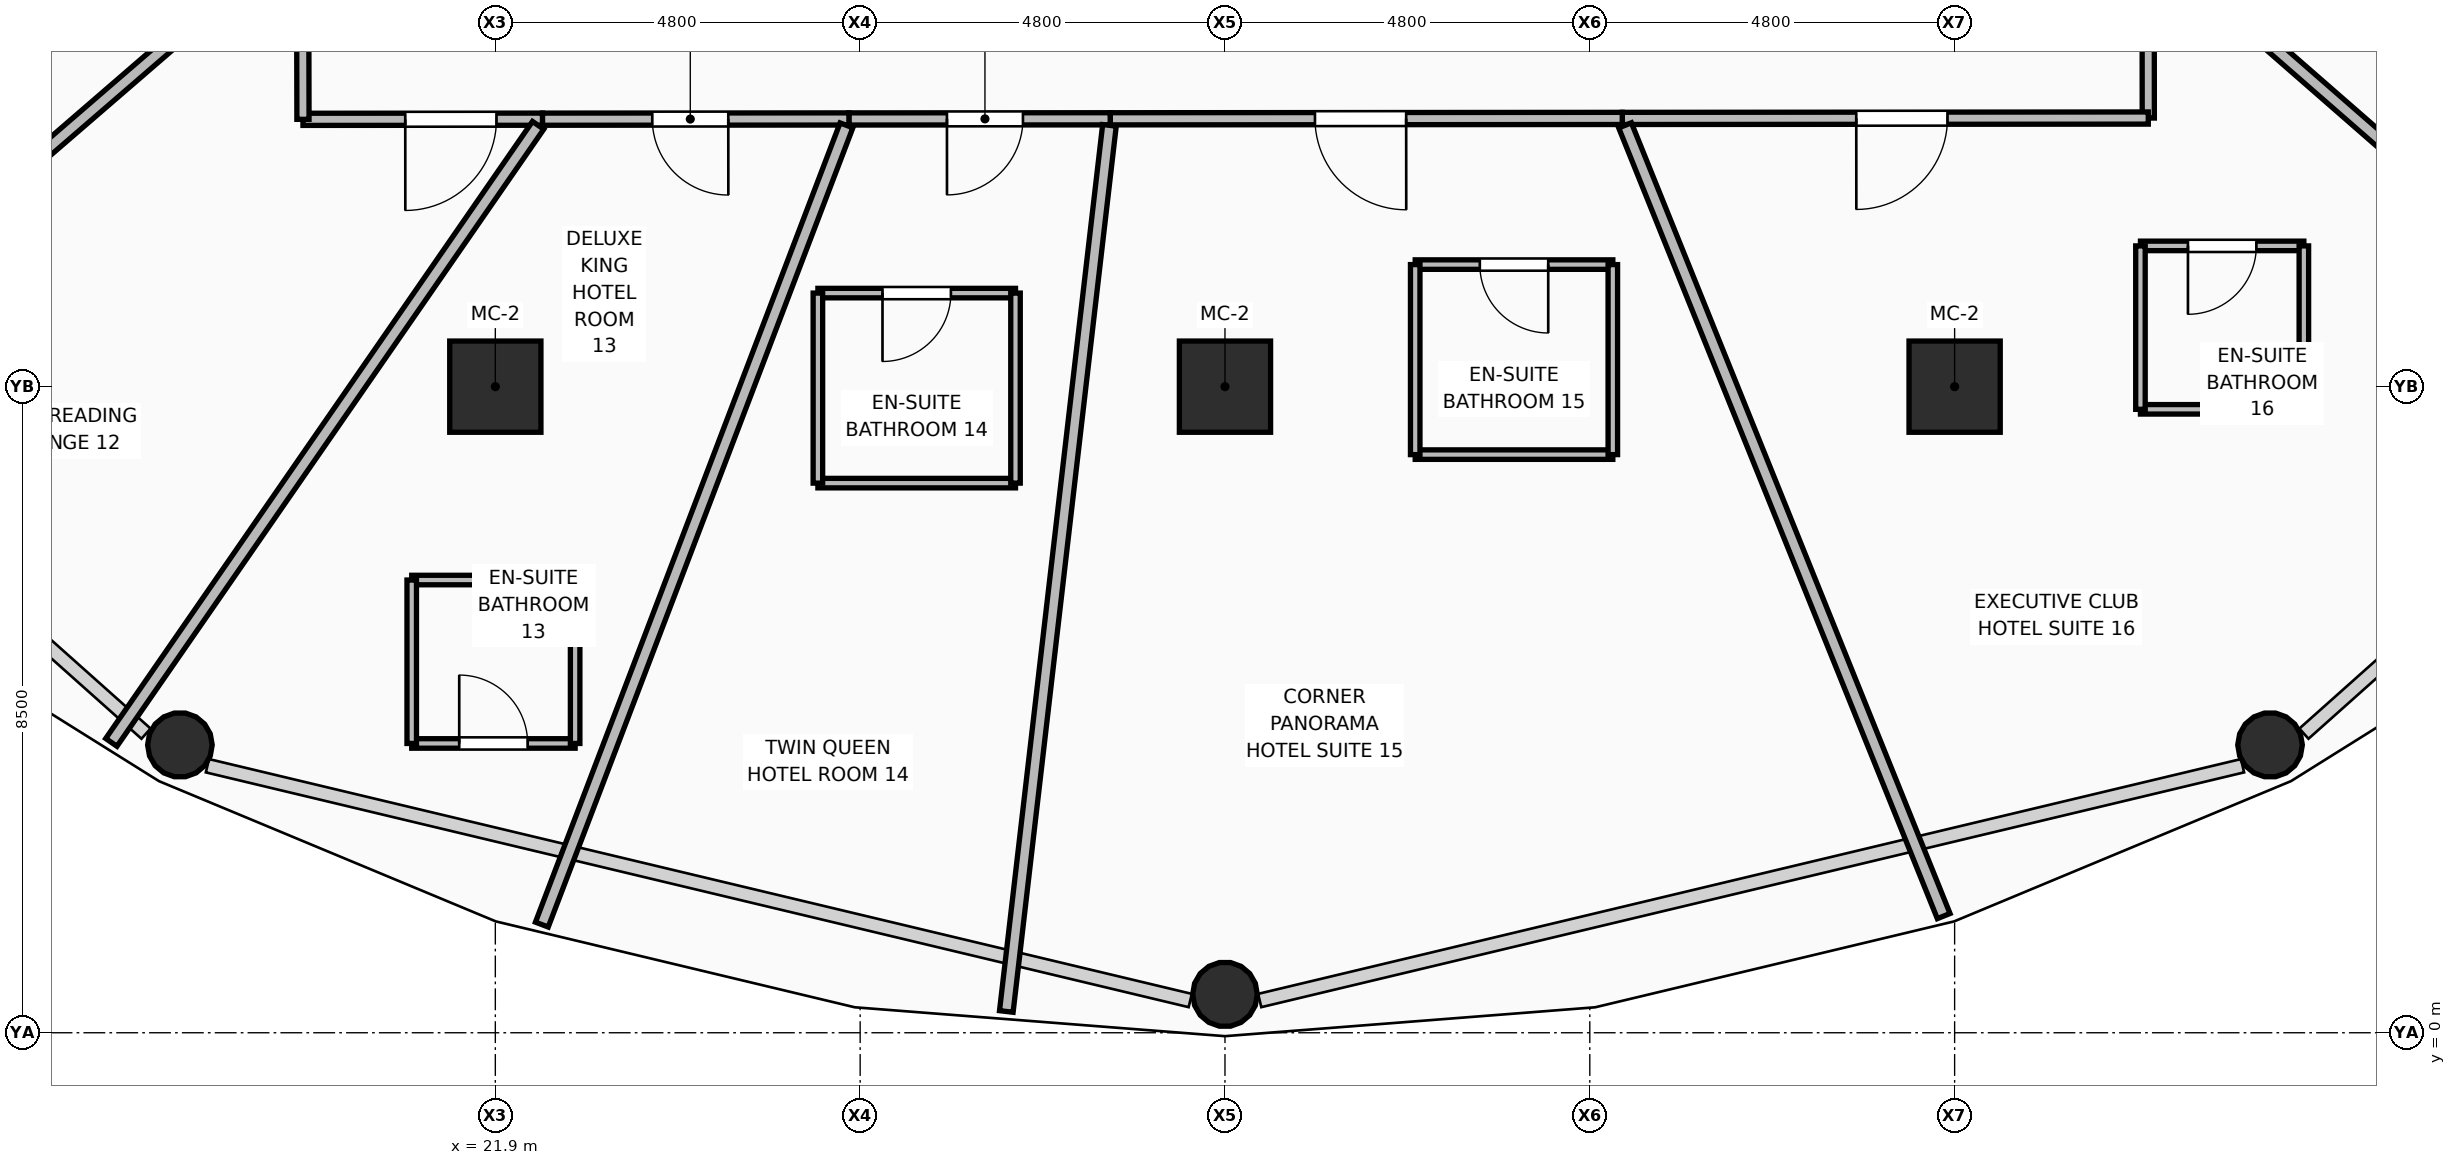
"""IFC4 building model, lengths in metres.
Left out: names, types, materials, properties, quantities, classifications, styles, units other than length and angle.
Written with IfcOpenShell. Run it as: python <this file> out.ifc"""

import sys

from ifc_helpers import new_model, si_unit, direction, frame, frame_2d, origin, origin_2d, place, context, subcontext, project, spatial, rectangle, hollow_rectangle, hollow_circle, extrude, element, fill, save


model = new_model("IFC4")
c1 = context("Model", 3, precision=1e-05, world=origin(), true_north=direction((0.0, 1.0)))
c2 = subcontext(c1, "Body", "Model", "MODEL_VIEW")
j1 = project(units=[si_unit("LENGTHUNIT", "METRE"), si_unit("PLANEANGLEUNIT", "RADIAN")], contexts=[c1])
p1 = place(None, origin())
s1 = spatial("IfcSite", under=j1, at=p1, CompositionType="ELEMENT")
p2 = place(p1, origin())
s2 = spatial("IfcBuilding", under=s1, at=p2, CompositionType="ELEMENT")
p3 = place(p2, frame((0.0, 0.0, 79.5)))
s3 = spatial("IfcBuildingStorey", under=s2, at=p3, CompositionType="ELEMENT", Elevation=79.5)
for number, where, z_axis, x_axis in (
    (1, (21.9, 8.5, 0.0), (0.0, 0.0, 1.0), (1.0, 0.0, 0.0)),
    (2, (31.5, 8.5, 0.0), (0.0, 0.0, 1.0), (1.0, 0.0, 0.0)),
    (3, (41.1, 8.5, 0.0), (0.0, 0.0, 1.0), (1.0, 0.0, 0.0)),
):
    element("IfcColumn", number, at=place(p3, frame(where, z_axis=z_axis, x_axis=x_axis)), inside=s3, PredefinedType="COLUMN", context=c2, shape_type="SweptSolid", body=[
        extrude(hollow_rectangle(XDim=1.2, YDim=1.2, WallThickness=0.045, at=origin_2d()), origin(), (0.0, 0.0, 1.0), 3.75),
    ])
for number, where, z_axis, x_axis in (
    (4, (17.75, 3.787, 0.0), (0.0, 0.0, 1.0), (1.0, 0.0, 0.0)),
    (5, (31.5, 0.505, 0.0), (0.0, 0.0, 1.0), (1.0, 0.0, 0.0)),
    (6, (45.25, 3.787, 0.0), (0.0, 0.0, 1.0), (1.0, 0.0, 0.0)),
):
    element("IfcColumn", number, at=place(p3, frame(where, z_axis=z_axis, x_axis=x_axis)), inside=s3, PredefinedType="COLUMN", context=c2, shape_type="SweptSolid", body=[
        extrude(hollow_circle(Radius=0.425, WallThickness=0.04, at=origin_2d()), origin(), (0.0, 0.0, 1.0), 3.57),
    ])
p4 = place(p3, frame((43.646, 14.406, 0.0), z_axis=(0.0, 0.0, 1.0), x_axis=(0.00082338383, -0.999999661019, 0.0)))
e7 = element("IfcWall", 7, at=p4, inside=s3, PredefinedType="PARTITIONING", context=c2, shape_type="SweptSolid", body=[
    extrude(rectangle(XDim=2.372, YDim=0.16, at=frame_2d((1.186, 0.0))), origin(), (0.0, 0.0, 1.0), 3.55),
])
p5 = place(p3, frame((43.648, 12.034, 0.0), z_axis=(0.0, 0.0, 1.0), x_axis=(-0.999999751123, -0.000705516968, 0.0)))
e8 = element("IfcWall", 8, at=p5, inside=s3, PredefinedType="PARTITIONING", context=c2, shape_type="SweptSolid", body=[
    extrude(rectangle(XDim=6.921, YDim=0.16, at=frame_2d((3.46, 0.0))), origin(), (0.0, 0.0, 1.0), 2.928),
])
p6 = place(p5, frame((2.642, 0.0, 0.0)))
e9 = element("IfcOpeningElement", 9, at=p6, cuts=e8, PredefinedType="OPENING", context=c2, shape_type="SweptSolid", body=[
    extrude(rectangle(XDim=1.2, YDim=2.1, at=frame_2d((0.6, 1.05))), frame((0.0, 0.09, 0.0), z_axis=(0.0, -1.0, 0.0), x_axis=(1.0, 0.0, 0.0)), (0.0, 0.0, 1.0), 0.18),
])
p7 = place(p3, frame((36.727, 12.029, 0.0), z_axis=(0.0, 0.0, 1.0), x_axis=(-0.999999710434, -0.000761007209, 0.0)))
e10 = element("IfcWall", 10, at=p7, inside=s3, PredefinedType="PARTITIONING", context=c2, shape_type="SweptSolid", body=[
    extrude(rectangle(XDim=6.737, YDim=0.16, at=frame_2d((3.369, 0.0))), origin(), (0.0, 0.0, 1.0), 2.928),
])
p8 = place(p7, frame((2.843, 0.0, 0.0)))
e11 = element("IfcOpeningElement", 11, at=p8, cuts=e10, PredefinedType="OPENING", context=c2, shape_type="SweptSolid", body=[
    extrude(rectangle(XDim=1.2, YDim=2.1, at=frame_2d((0.6, 1.05))), frame((0.0, 0.09, 0.0), z_axis=(0.0, -1.0, 0.0), x_axis=(1.0, 0.0, 0.0)), (0.0, 0.0, 1.0), 0.18),
])
p9 = place(p3, frame((29.99, 12.024, 0.0), z_axis=(0.0, 0.0, 1.0), x_axis=(-0.999999838631, -0.00056810103, 0.0)))
e12 = element("IfcWall", 12, at=p9, inside=s3, PredefinedType="PARTITIONING", context=c2, shape_type="SweptSolid", body=[
    extrude(rectangle(XDim=3.438, YDim=0.16, at=frame_2d((1.719, 0.0))), origin(), (0.0, 0.0, 1.0), 3.55),
])
p10 = place(p9, frame((1.148, 0.0, 0.0)))
e13 = element("IfcOpeningElement", 13, at=p10, cuts=e12, PredefinedType="OPENING", context=c2, shape_type="SweptSolid", body=[
    extrude(rectangle(XDim=1.0, YDim=2.1, at=frame_2d((0.5, 1.05))), frame((0.0, 0.09, 0.0), z_axis=(0.0, -1.0, 0.0), x_axis=(1.0, 0.0, 0.0)), (0.0, 0.0, 1.0), 0.18),
])
p11 = place(p3, frame((26.552, 12.022, 0.0), z_axis=(0.0, 0.0, 1.0), x_axis=(-0.999999736017, -0.000726611979, 0.0)))
e14 = element("IfcWall", 14, at=p11, inside=s3, PredefinedType="PARTITIONING", context=c2, shape_type="SweptSolid", body=[
    extrude(rectangle(XDim=4.032, YDim=0.16, at=frame_2d((2.016, 0.0))), origin(), (0.0, 0.0, 1.0), 3.55),
])
p12 = place(p11, frame((1.587, 0.0, 0.0)))
e15 = element("IfcOpeningElement", 15, at=p12, cuts=e14, PredefinedType="OPENING", context=c2, shape_type="SweptSolid", body=[
    extrude(rectangle(XDim=1.0, YDim=2.1, at=frame_2d((0.5, 1.05))), frame((0.0, 0.09, 0.0), z_axis=(0.0, -1.0, 0.0), x_axis=(1.0, 0.0, 0.0)), (0.0, 0.0, 1.0), 0.18),
])
p13 = place(p3, frame((22.52, 12.019, 0.0), z_axis=(0.0, 0.0, 1.0), x_axis=(-0.999999807912, -0.000619818584, 0.0)))
e16 = element("IfcWall", 16, at=p13, inside=s3, PredefinedType="PARTITIONING", context=c2, shape_type="SweptSolid", body=[
    extrude(rectangle(XDim=3.151, YDim=0.16, at=frame_2d((1.576, 0.0))), origin(), (0.0, 0.0, 1.0), 2.928),
])
p14 = place(p13, frame((0.605, 0.0, 0.0)))
e17 = element("IfcOpeningElement", 17, at=p14, cuts=e16, PredefinedType="OPENING", context=c2, shape_type="SweptSolid", body=[
    extrude(rectangle(XDim=1.2, YDim=2.1, at=frame_2d((0.6, 1.05))), frame((0.0, 0.09, 0.0), z_axis=(0.0, -1.0, 0.0), x_axis=(1.0, 0.0, 0.0)), (0.0, 0.0, 1.0), 0.18),
])
p15 = place(p3, frame((19.369, 12.017, 0.0), z_axis=(0.0, 0.0, 1.0), x_axis=(-0.001947036808, 0.999998104522, 0.0)))
e18 = element("IfcWall", 18, at=p15, inside=s3, PredefinedType="PARTITIONING", context=c2, shape_type="SweptSolid", body=[
    extrude(rectangle(XDim=2.508, YDim=0.16, at=frame_2d((1.254, 0.0))), origin(), (0.0, 0.0, 1.0), 3.55),
])
p16 = place(p3, frame((19.272, 18.099, 0.0), z_axis=(0.0, 0.0, 1.0), x_axis=(-0.870816794363, -0.491607679614, 0.0)))
e19 = element("IfcWall", 19, at=p16, inside=s3, PredefinedType="PARTITIONING", context=c2, shape_type="SweptSolid", body=[
    extrude(rectangle(XDim=13.011, YDim=0.18, at=frame_2d((6.505, 0.0))), origin(), (0.0, 0.0, 1.0), 2.775),
])
p17 = place(p3, frame((19.272, 14.446, 0.0), z_axis=(0.0, 0.0, 1.0), x_axis=(-0.756957430289, -0.653464190855, 0.0)))
e20 = element("IfcWall", 20, at=p17, inside=s3, PredefinedType="PARTITIONING", context=c2, shape_type="SweptSolid", body=[
    extrude(rectangle(XDim=10.29, YDim=0.18, at=frame_2d((5.145, 0.0))), origin(), (0.0, 0.0, 1.0), 2.775),
])
p18 = place(p3, frame((22.463, 11.938, 0.0), z_axis=(0.0, 0.0, 1.0), x_axis=(-0.568860087872, -0.822434313746, 0.0)))
e21 = element("IfcWall", 21, at=p18, inside=s3, PredefinedType="PARTITIONING", context=c2, shape_type="SweptSolid", body=[
    extrude(rectangle(XDim=9.871, YDim=0.18, at=frame_2d((4.935, 0.0))), origin(), (0.0, 0.0, 1.0), 2.775),
])
p19 = place(p3, frame((26.52, 11.938, 0.0), z_axis=(0.0, 0.0, 1.0), x_axis=(-0.356180272112, -0.934417258915, 0.0)))
e22 = element("IfcWall", 22, at=p19, inside=s3, PredefinedType="PARTITIONING", context=c2, shape_type="SweptSolid", body=[
    extrude(rectangle(XDim=11.253, YDim=0.18, at=frame_2d((5.626, 0.0))), origin(), (0.0, 0.0, 1.0), 2.775),
])
p20 = place(p3, frame((29.98, 11.938, 0.0), z_axis=(0.0, 0.0, 1.0), x_axis=(-0.115614932855, -0.993294109165, 0.0)))
e23 = element("IfcWall", 23, at=p20, inside=s3, PredefinedType="PARTITIONING", context=c2, shape_type="SweptSolid", body=[
    extrude(rectangle(XDim=11.737, YDim=0.18, at=frame_2d((5.868, 0.0))), origin(), (0.0, 0.0, 1.0), 2.775),
])
p21 = place(p3, frame((36.764, 11.938, 0.0), z_axis=(0.0, 0.0, 1.0), x_axis=(0.373765091029, -0.927523399558, 0.0)))
e24 = element("IfcWall", 24, at=p21, inside=s3, PredefinedType="PARTITIONING", context=c2, shape_type="SweptSolid", body=[
    extrude(rectangle(XDim=11.216, YDim=0.18, at=frame_2d((5.608, 0.0))), origin(), (0.0, 0.0, 1.0), 2.775),
])
p22 = place(p3, frame((43.728, 14.335, 0.0), z_axis=(0.0, 0.0, 1.0), x_axis=(0.753557452015, -0.657382055211, 0.0)))
e25 = element("IfcWall", 25, at=p22, inside=s3, PredefinedType="PARTITIONING", context=c2, shape_type="SweptSolid", body=[
    extrude(rectangle(XDim=10.2, YDim=0.18, at=frame_2d((5.1, 0.0))), origin(), (0.0, 0.0, 1.0), 2.775),
])
p23 = place(p3, frame((43.728, 18.232, 0.0), z_axis=(0.0, 0.0, 1.0), x_axis=(0.874929134989, -0.484250977022, 0.0)))
e26 = element("IfcWall", 26, at=p23, inside=s3, PredefinedType="PARTITIONING", context=c2, shape_type="SweptSolid", body=[
    extrude(rectangle(XDim=13.111, YDim=0.18, at=frame_2d((6.555, 0.0))), origin(), (0.0, 0.0, 1.0), 2.775),
])
p24 = place(p3, frame((20.8, 3.806, 0.0), z_axis=(0.0, 0.0, 1.0), x_axis=(1.0, 0.0, 0.0)))
e27 = element("IfcWall", 27, at=p24, inside=s3, PredefinedType="PARTITIONING", context=c2, shape_type="SweptSolid", body=[
    extrude(rectangle(XDim=2.15, YDim=0.125, at=frame_2d((1.075, 0.0))), origin(), (0.0, 0.0, 1.0), 3.55),
])
p25 = place(p24, frame((0.625, 0.0, 0.0)))
e28 = element("IfcOpeningElement", 28, at=p25, cuts=e27, PredefinedType="OPENING", context=c2, shape_type="SweptSolid", body=[
    extrude(rectangle(XDim=0.9, YDim=2.1, at=frame_2d((0.45, 1.05))), frame((0.0, 0.073, 0.0), z_axis=(0.0, -1.0, 0.0), x_axis=(1.0, 0.0, 0.0)), (0.0, 0.0, 1.0), 0.145),
])
p26 = place(p3, frame((20.8, 5.956, 0.0), z_axis=(0.0, 0.0, 1.0), x_axis=(1.0, 0.0, 0.0)))
e29 = element("IfcWall", 29, at=p26, inside=s3, PredefinedType="PARTITIONING", context=c2, shape_type="SweptSolid", body=[
    extrude(rectangle(XDim=2.15, YDim=0.125, at=frame_2d((1.075, 0.0))), origin(), (0.0, 0.0, 1.0), 3.55),
])
for number, where, z_axis, x_axis in (
    (30, (20.8, 3.806, 0.0), (0.0, 0.0, 1.0), (0.0, 1.0, 0.0)),
    (31, (22.95, 3.806, 0.0), (0.0, 0.0, 1.0), (0.0, 1.0, 0.0)),
):
    element("IfcWall", number, at=place(p3, frame(where, z_axis=z_axis, x_axis=x_axis)), inside=s3, PredefinedType="PARTITIONING", context=c2, shape_type="SweptSolid", body=[
        extrude(rectangle(XDim=2.15, YDim=0.125, at=frame_2d((1.075, 0.0))), origin(), (0.0, 0.0, 1.0), 3.55),
    ])
p27 = place(p3, frame((26.144, 7.231, 0.0), z_axis=(0.0, 0.0, 1.0), x_axis=(1.0, 0.0, 0.0)))
e32 = element("IfcWall", 32, at=p27, inside=s3, PredefinedType="PARTITIONING", context=c2, shape_type="SweptSolid", body=[
    extrude(rectangle(XDim=2.6, YDim=0.125, at=frame_2d((1.3, 0.0))), origin(), (0.0, 0.0, 1.0), 3.55),
])
p28 = place(p3, frame((26.144, 9.731, 0.0), z_axis=(0.0, 0.0, 1.0), x_axis=(1.0, 0.0, 0.0)))
e33 = element("IfcWall", 33, at=p28, inside=s3, PredefinedType="PARTITIONING", context=c2, shape_type="SweptSolid", body=[
    extrude(rectangle(XDim=2.6, YDim=0.125, at=frame_2d((1.3, 0.0))), origin(), (0.0, 0.0, 1.0), 3.55),
])
p29 = place(p28, frame((0.85, 0.0, 0.0)))
e34 = element("IfcOpeningElement", 34, at=p29, cuts=e33, PredefinedType="OPENING", context=c2, shape_type="SweptSolid", body=[
    extrude(rectangle(XDim=0.9, YDim=2.1, at=frame_2d((0.45, 1.05))), frame((0.0, 0.073, 0.0), z_axis=(0.0, -1.0, 0.0), x_axis=(1.0, 0.0, 0.0)), (0.0, 0.0, 1.0), 0.145),
])
for number, where, z_axis, x_axis in (
    (35, (26.144, 7.231, 0.0), (0.0, 0.0, 1.0), (0.0, 1.0, 0.0)),
    (36, (28.744, 7.231, 0.0), (0.0, 0.0, 1.0), (0.0, 1.0, 0.0)),
):
    element("IfcWall", number, at=place(p3, frame(where, z_axis=z_axis, x_axis=x_axis)), inside=s3, PredefinedType="PARTITIONING", context=c2, shape_type="SweptSolid", body=[
        extrude(rectangle(XDim=2.5, YDim=0.125, at=frame_2d((1.25, 0.0))), origin(), (0.0, 0.0, 1.0), 3.55),
    ])
p30 = place(p3, frame((34.003, 7.606, 0.0), z_axis=(0.0, 0.0, 1.0), x_axis=(1.0, 0.0, 0.0)))
e37 = element("IfcWall", 37, at=p30, inside=s3, PredefinedType="PARTITIONING", context=c2, shape_type="SweptSolid", body=[
    extrude(rectangle(XDim=2.6, YDim=0.125, at=frame_2d((1.3, 0.0))), origin(), (0.0, 0.0, 1.0), 3.55),
])
p31 = place(p3, frame((34.003, 10.106, 0.0), z_axis=(0.0, 0.0, 1.0), x_axis=(1.0, 0.0, 0.0)))
e38 = element("IfcWall", 38, at=p31, inside=s3, PredefinedType="PARTITIONING", context=c2, shape_type="SweptSolid", body=[
    extrude(rectangle(XDim=2.6, YDim=0.125, at=frame_2d((1.3, 0.0))), origin(), (0.0, 0.0, 1.0), 3.55),
])
p32 = place(p31, frame((0.85, 0.0, 0.0)))
e39 = element("IfcOpeningElement", 39, at=p32, cuts=e38, PredefinedType="OPENING", context=c2, shape_type="SweptSolid", body=[
    extrude(rectangle(XDim=0.9, YDim=2.1, at=frame_2d((0.45, 1.05))), frame((0.0, 0.073, 0.0), z_axis=(0.0, -1.0, 0.0), x_axis=(1.0, 0.0, 0.0)), (0.0, 0.0, 1.0), 0.145),
])
for number, where, z_axis, x_axis in (
    (40, (34.003, 7.606, 0.0), (0.0, 0.0, 1.0), (0.0, 1.0, 0.0)),
    (41, (36.603, 7.606, 0.0), (0.0, 0.0, 1.0), (0.0, 1.0, 0.0)),
):
    element("IfcWall", number, at=place(p3, frame(where, z_axis=z_axis, x_axis=x_axis)), inside=s3, PredefinedType="PARTITIONING", context=c2, shape_type="SweptSolid", body=[
        extrude(rectangle(XDim=2.5, YDim=0.125, at=frame_2d((1.25, 0.0))), origin(), (0.0, 0.0, 1.0), 3.55),
    ])
p33 = place(p3, frame((43.545, 8.202, 0.0), z_axis=(0.0, 0.0, 1.0), x_axis=(1.0, 0.0, 0.0)))
e42 = element("IfcWall", 42, at=p33, inside=s3, PredefinedType="PARTITIONING", context=c2, shape_type="SweptSolid", body=[
    extrude(rectangle(XDim=2.15, YDim=0.125, at=frame_2d((1.075, 0.0))), origin(), (0.0, 0.0, 1.0), 2.928),
])
p34 = place(p3, frame((43.545, 10.352, 0.0), z_axis=(0.0, 0.0, 1.0), x_axis=(1.0, 0.0, 0.0)))
e43 = element("IfcWall", 43, at=p34, inside=s3, PredefinedType="PARTITIONING", context=c2, shape_type="SweptSolid", body=[
    extrude(rectangle(XDim=2.15, YDim=0.125, at=frame_2d((1.075, 0.0))), origin(), (0.0, 0.0, 1.0), 2.928),
])
p35 = place(p34, frame((0.625, 0.0, 0.0)))
e44 = element("IfcOpeningElement", 44, at=p35, cuts=e43, PredefinedType="OPENING", context=c2, shape_type="SweptSolid", body=[
    extrude(rectangle(XDim=0.9, YDim=2.1, at=frame_2d((0.45, 1.05))), frame((0.0, 0.073, 0.0), z_axis=(0.0, -1.0, 0.0), x_axis=(1.0, 0.0, 0.0)), (0.0, 0.0, 1.0), 0.145),
])
p36 = place(p3, frame((43.545, 8.202, 0.0), z_axis=(0.0, 0.0, 1.0), x_axis=(0.0, 1.0, 0.0)))
e45 = element("IfcWall", 45, at=p36, inside=s3, PredefinedType="PARTITIONING", context=c2, shape_type="SweptSolid", body=[
    extrude(rectangle(XDim=2.15, YDim=0.125, at=frame_2d((1.075, 0.0))), origin(), (0.0, 0.0, 1.0), 2.928),
])
p37 = place(p3, frame((45.695, 8.202, 0.0), z_axis=(0.0, 0.0, 1.0), x_axis=(0.0, 1.0, 0.0)))
e46 = element("IfcWall", 46, at=p37, inside=s3, PredefinedType="PARTITIONING", context=c2, shape_type="SweptSolid", body=[
    extrude(rectangle(XDim=2.15, YDim=0.125, at=frame_2d((1.075, 0.0))), origin(), (0.0, 0.0, 1.0), 3.55),
])
p38 = place(p14, origin())
e47 = element("IfcDoor", 47, at=p38, inside=s3, OperationType="SINGLE_SWING_RIGHT", PredefinedType="DOOR", context=c2, shape_type="SweptSolid", body=[
    extrude(rectangle(XDim=1.2, YDim=2.1, at=frame_2d((0.6, 1.05))), frame((0.0, 0.025, 0.0), z_axis=(0.0, -1.0, 0.0), x_axis=(1.0, 0.0, 0.0)), (0.0, 0.0, 1.0), 0.05),
])
fill(e17, e47)
p39 = place(p25, origin())
e48 = element("IfcDoor", 48, at=p39, inside=s3, OperationType="SINGLE_SWING_LEFT", PredefinedType="DOOR", context=c2, shape_type="SweptSolid", body=[
    extrude(rectangle(XDim=0.9, YDim=2.1, at=frame_2d((0.45, 1.05))), frame((0.0, 0.025, 0.0), z_axis=(0.0, -1.0, 0.0), x_axis=(1.0, 0.0, 0.0)), (0.0, 0.0, 1.0), 0.05),
])
fill(e28, e48)
p40 = place(p12, origin())
e49 = element("IfcDoor", 49, at=p40, inside=s3, OperationType="SINGLE_SWING_LEFT", PredefinedType="DOOR", context=c2, shape_type="SweptSolid", body=[
    extrude(rectangle(XDim=1.0, YDim=2.1, at=frame_2d((0.5, 1.05))), frame((0.0, 0.025, 0.0), z_axis=(0.0, -1.0, 0.0), x_axis=(1.0, 0.0, 0.0)), (0.0, 0.0, 1.0), 0.05),
])
fill(e15, e49)
p41 = place(p29, frame((0.9, 0.0, 0.0), z_axis=(0.0, 0.0, 1.0), x_axis=(-1.0, 0.0, 0.0)))
e50 = element("IfcDoor", 50, at=p41, inside=s3, OperationType="SINGLE_SWING_RIGHT", PredefinedType="DOOR", context=c2, shape_type="SweptSolid", body=[
    extrude(rectangle(XDim=0.9, YDim=2.1, at=frame_2d((0.45, 1.05))), frame((0.0, 0.025, 0.0), z_axis=(0.0, -1.0, 0.0), x_axis=(1.0, 0.0, 0.0)), (0.0, 0.0, 1.0), 0.05),
])
fill(e34, e50)
p42 = place(p10, origin())
e51 = element("IfcDoor", 51, at=p42, inside=s3, OperationType="SINGLE_SWING_RIGHT", PredefinedType="DOOR", context=c2, shape_type="SweptSolid", body=[
    extrude(rectangle(XDim=1.0, YDim=2.1, at=frame_2d((0.5, 1.05))), frame((0.0, 0.025, 0.0), z_axis=(0.0, -1.0, 0.0), x_axis=(1.0, 0.0, 0.0)), (0.0, 0.0, 1.0), 0.05),
])
fill(e13, e51)
p43 = place(p32, frame((0.9, 0.0, 0.0), z_axis=(0.0, 0.0, 1.0), x_axis=(-1.0, 0.0, 0.0)))
e52 = element("IfcDoor", 52, at=p43, inside=s3, OperationType="SINGLE_SWING_LEFT", PredefinedType="DOOR", context=c2, shape_type="SweptSolid", body=[
    extrude(rectangle(XDim=0.9, YDim=2.1, at=frame_2d((0.45, 1.05))), frame((0.0, 0.025, 0.0), z_axis=(0.0, -1.0, 0.0), x_axis=(1.0, 0.0, 0.0)), (0.0, 0.0, 1.0), 0.05),
])
fill(e39, e52)
p44 = place(p8, origin())
e53 = element("IfcDoor", 53, at=p44, inside=s3, OperationType="SINGLE_SWING_LEFT", PredefinedType="DOOR", context=c2, shape_type="SweptSolid", body=[
    extrude(rectangle(XDim=1.2, YDim=2.1, at=frame_2d((0.6, 1.05))), frame((0.0, 0.025, 0.0), z_axis=(0.0, -1.0, 0.0), x_axis=(1.0, 0.0, 0.0)), (0.0, 0.0, 1.0), 0.05),
])
fill(e11, e53)
p45 = place(p35, frame((0.9, 0.0, 0.0), z_axis=(0.0, 0.0, 1.0), x_axis=(-1.0, 0.0, 0.0)))
e54 = element("IfcDoor", 54, at=p45, inside=s3, OperationType="SINGLE_SWING_RIGHT", PredefinedType="DOOR", context=c2, shape_type="SweptSolid", body=[
    extrude(rectangle(XDim=0.9, YDim=2.1, at=frame_2d((0.45, 1.05))), frame((0.0, 0.025, 0.0), z_axis=(0.0, -1.0, 0.0), x_axis=(1.0, 0.0, 0.0)), (0.0, 0.0, 1.0), 0.05),
])
fill(e44, e54)
p46 = place(p6, origin())
e55 = element("IfcDoor", 55, at=p46, inside=s3, OperationType="SINGLE_SWING_RIGHT", PredefinedType="DOOR", context=c2, shape_type="SweptSolid", body=[
    extrude(rectangle(XDim=1.2, YDim=2.1, at=frame_2d((0.6, 1.05))), frame((0.0, 0.025, 0.0), z_axis=(0.0, -1.0, 0.0), x_axis=(1.0, 0.0, 0.0)), (0.0, 0.0, 1.0), 0.05),
])
fill(e9, e55)
save(model, sys.argv[1])
